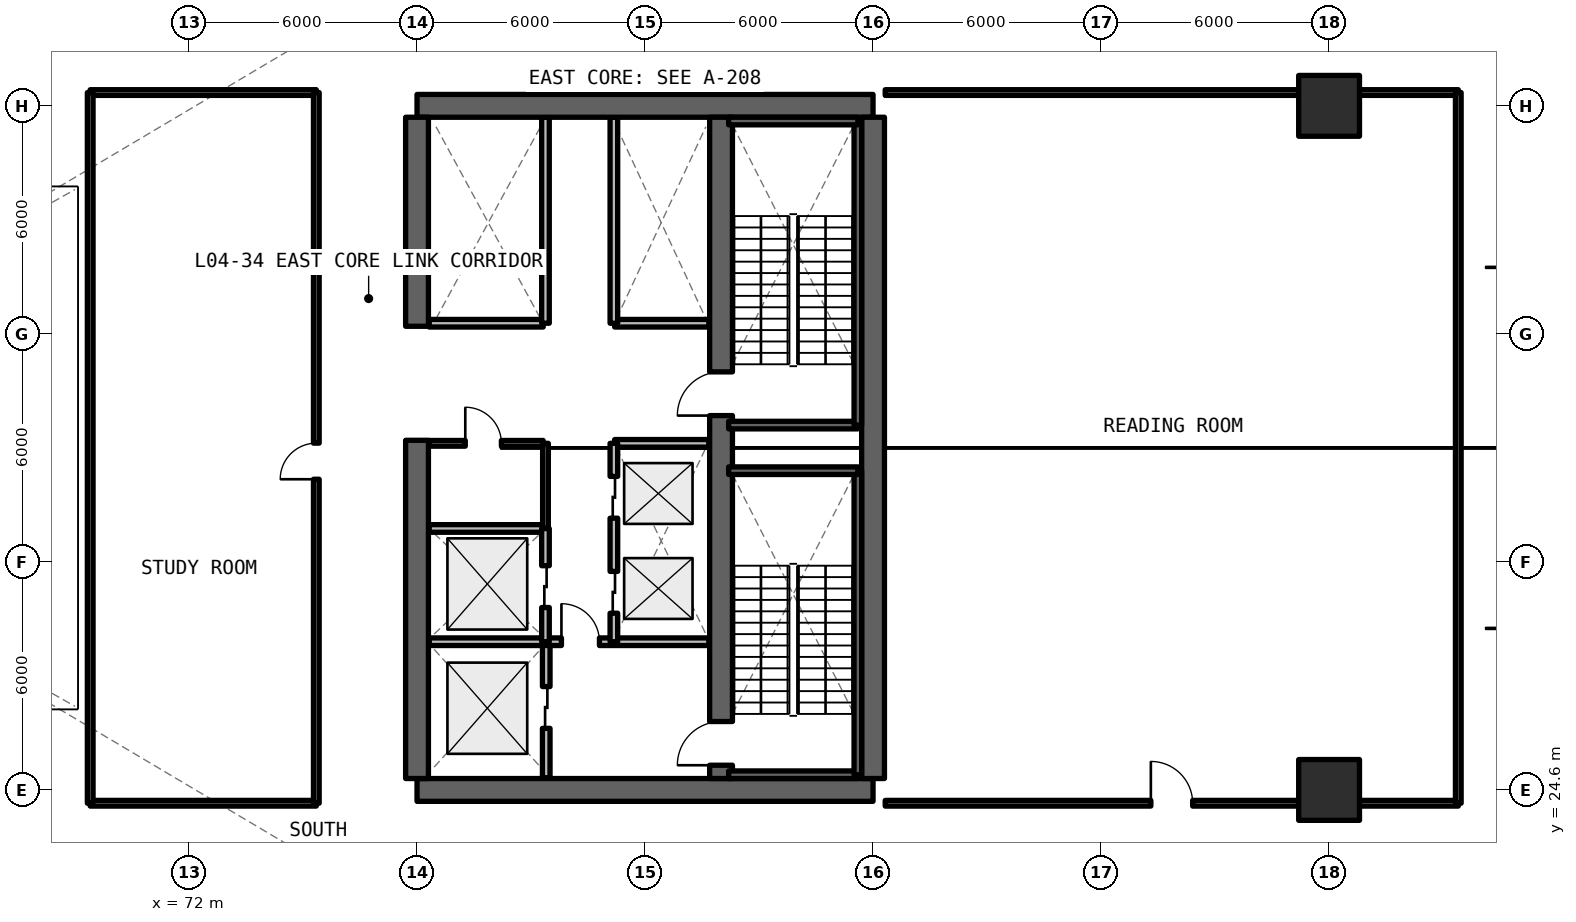
"""IFC4 building model, lengths in metres.
Left out: names, types, materials, properties, quantities, classifications, styles, units other than length and angle.
Written with IfcOpenShell. Run it as: python <this file> out.ifc"""

import sys

from ifc_helpers import new_model, si_unit, direction, frame, frame_2d, origin, origin_2d, place, context, subcontext, project, spatial, rectangle, extrude, element, fill, save


model = new_model("IFC4")
c1 = context("Model", 3, precision=1e-05, world=origin(), true_north=direction((0.0, 1.0)))
c2 = subcontext(c1, "Body", "Model", "MODEL_VIEW")
j1 = project(units=[si_unit("LENGTHUNIT", "METRE"), si_unit("PLANEANGLEUNIT", "RADIAN")], contexts=[c1])
p1 = place(None, origin())
s1 = spatial("IfcSite", under=j1, at=p1, CompositionType="ELEMENT")
p2 = place(p1, origin())
s2 = spatial("IfcBuilding", under=s1, at=p2, CompositionType="ELEMENT")
p3 = place(p2, frame((0.0, 0.0, 14.85)))
s3 = spatial("IfcBuildingStorey", under=s2, at=p3, CompositionType="ELEMENT", Elevation=14.85)
for number, where, z_axis, x_axis in (
    (1, (78.0, 24.6, 0.0), (0.0, 0.0, 1.0), (1.0, 0.0, 0.0)),
    (2, (90.0, 42.6, 0.0), (0.0, 0.0, 1.0), (-1.0, 0.0, 0.0)),
):
    element("IfcWall", number, at=place(p3, frame(where, z_axis=z_axis, x_axis=x_axis)), inside=s3, PredefinedType="SHEAR", context=c2, shape_type="SweptSolid", body=[
        extrude(rectangle(XDim=12.0, YDim=0.6, at=frame_2d((6.0, 0.0))), origin(), (0.0, 0.0, 1.0), 4.62),
    ])
p4 = place(p3, frame((90.0, 24.9, 0.0), z_axis=(0.0, 0.0, 1.0), x_axis=(0.0, 1.0, 0.0)))
e3 = element("IfcWall", 3, at=p4, inside=s3, PredefinedType="SHEAR", context=c2, shape_type="SweptSolid", body=[
    extrude(rectangle(XDim=17.4, YDim=0.6, at=frame_2d((8.7, 0.0))), origin(), (0.0, 0.0, 1.0), 4.62),
])
p5 = place(p3, frame((78.0, 24.9, 0.0), z_axis=(0.0, 0.0, 1.0), x_axis=(0.0, 1.0, 0.0)))
e4 = element("IfcWall", 4, at=p5, inside=s3, PredefinedType="SHEAR", context=c2, shape_type="SweptSolid", body=[
    extrude(rectangle(XDim=8.9, YDim=0.6, at=frame_2d((4.45, 0.0))), origin(), (0.0, 0.0, 1.0), 4.62),
])
p6 = place(p3, frame((78.0, 36.8, 0.0), z_axis=(0.0, 0.0, 1.0), x_axis=(0.0, 1.0, 0.0)))
e5 = element("IfcWall", 5, at=p6, inside=s3, PredefinedType="SHEAR", context=c2, shape_type="SweptSolid", body=[
    extrude(rectangle(XDim=5.5, YDim=0.6, at=frame_2d((2.75, 0.0))), origin(), (0.0, 0.0, 1.0), 4.62),
])
p7 = place(p3, frame((86.0, 24.9, 0.0), z_axis=(0.0, 0.0, 1.0), x_axis=(0.0, 1.0, 0.0)))
e6 = element("IfcWall", 6, at=p7, inside=s3, PredefinedType="SHEAR", context=c2, shape_type="SweptSolid", body=[
    extrude(rectangle(XDim=17.4, YDim=0.6, at=frame_2d((8.7, 0.0))), origin(), (0.0, 0.0, 1.0), 4.62),
])
p8 = place(p7, frame((0.35, 0.0, 0.0)))
e7 = element("IfcOpeningElement", 7, at=p8, cuts=e6, PredefinedType="OPENING", context=c2, shape_type="SweptSolid", body=[
    extrude(rectangle(XDim=1.15, YDim=2.15, at=frame_2d((0.575, 1.075))), frame((0.0, 0.31, 0.0), z_axis=(0.0, -1.0, 0.0), x_axis=(1.0, 0.0, 0.0)), (0.0, 0.0, 1.0), 0.62),
])
p9 = place(p7, frame((9.55, 0.0, 0.0)))
e8 = element("IfcOpeningElement", 8, at=p9, cuts=e6, PredefinedType="OPENING", context=c2, shape_type="SweptSolid", body=[
    extrude(rectangle(XDim=1.15, YDim=2.15, at=frame_2d((0.575, 1.075))), frame((0.0, 0.31, 0.0), z_axis=(0.0, -1.0, 0.0), x_axis=(1.0, 0.0, 0.0)), (0.0, 0.0, 1.0), 0.62),
])
for number, where, z_axis, x_axis in (
    (9, (102.0, 24.6, 0.0), (0.0, 0.0, 1.0), (1.0, 0.0, 0.0)),
    (10, (102.0, 42.6, 0.0), (0.0, 0.0, 1.0), (1.0, 0.0, 0.0)),
):
    element("IfcColumn", number, at=place(p3, frame(where, z_axis=z_axis, x_axis=x_axis)), inside=s3, PredefinedType="COLUMN", context=c2, shape_type="SweptSolid", body=[
        extrude(rectangle(XDim=1.6, YDim=1.6, at=origin_2d()), origin(), (0.0, 0.0, 1.0), 4.62),
    ])
p10 = place(p3, frame((81.4, 24.92, 0.0), z_axis=(0.0, 0.0, 1.0), x_axis=(0.0, 1.0, 0.0)))
e11 = element("IfcWall", 11, at=p10, inside=s3, PredefinedType="SOLIDWALL", context=c2, shape_type="SweptSolid", body=[
    extrude(rectangle(XDim=3.58, YDim=0.2, at=frame_2d((1.79, 0.0))), origin(), (0.0, 0.0, 1.0), 3.56),
])
p11 = place(p10, frame((1.3, 0.0, 0.0)))
e12 = element("IfcOpeningElement", 12, at=p11, cuts=e11, PredefinedType="OPENING", context=c2, shape_type="SweptSolid", body=[
    extrude(rectangle(XDim=1.1, YDim=2.2, at=frame_2d((0.55, 1.1))), frame((0.0, 0.11, 0.0), z_axis=(0.0, -1.0, 0.0), x_axis=(1.0, 0.0, 0.0)), (0.0, 0.0, 1.0), 0.22),
])
p12 = place(p3, frame((78.32, 28.5, 0.0), z_axis=(0.0, 0.0, 1.0), x_axis=(1.0, 0.0, 0.0)))
e13 = element("IfcWall", 13, at=p12, inside=s3, PredefinedType="SOLIDWALL", context=c2, shape_type="SweptSolid", body=[
    extrude(rectangle(XDim=7.36, YDim=0.2, at=frame_2d((3.68, 0.0))), origin(), (0.0, 0.0, 1.0), 3.56),
])
p13 = place(p12, frame((3.48, 0.0, 0.0)))
e14 = element("IfcOpeningElement", 14, at=p13, cuts=e13, PredefinedType="OPENING", context=c2, shape_type="SweptSolid", body=[
    extrude(rectangle(XDim=1.0, YDim=2.15, at=frame_2d((0.5, 1.075))), frame((0.0, 0.11, 0.0), z_axis=(0.0, -1.0, 0.0), x_axis=(1.0, 0.0, 0.0)), (0.0, 0.0, 1.0), 0.22),
])
p14 = place(p3, frame((83.2, 33.72, 0.0), z_axis=(0.0, 0.0, 1.0), x_axis=(1.0, 0.0, 0.0)))
e15 = element("IfcWall", 15, at=p14, inside=s3, PredefinedType="SOLIDWALL", context=c2, shape_type="SweptSolid", body=[
    extrude(rectangle(XDim=2.48, YDim=0.2, at=frame_2d((1.24, 0.0))), origin(), (0.0, 0.0, 1.0), 3.56),
])
p15 = place(p3, frame((83.18, 28.5, 0.0), z_axis=(0.0, 0.0, 1.0), x_axis=(0.0, 1.0, 0.0)))
e16 = element("IfcWall", 16, at=p15, inside=s3, PredefinedType="SOLIDWALL", context=c2, shape_type="SweptSolid", body=[
    extrude(rectangle(XDim=5.22, YDim=0.2, at=frame_2d((2.61, 0.0))), origin(), (0.0, 0.0, 1.0), 3.56),
])
p16 = place(p15, frame((0.75, 0.0, 0.0)))
e17 = element("IfcOpeningElement", 17, at=p16, cuts=e16, PredefinedType="OPENING", context=c2, shape_type="SweptSolid", body=[
    extrude(rectangle(XDim=1.1, YDim=2.2, at=frame_2d((0.55, 1.1))), frame((0.0, 0.11, 0.0), z_axis=(0.0, -1.0, 0.0), x_axis=(1.0, 0.0, 0.0)), (0.0, 0.0, 1.0), 0.22),
])
p17 = place(p15, frame((3.25, 0.0, 0.0)))
e18 = element("IfcOpeningElement", 18, at=p17, cuts=e16, PredefinedType="OPENING", context=c2, shape_type="SweptSolid", body=[
    extrude(rectangle(XDim=1.1, YDim=2.2, at=frame_2d((0.55, 1.1))), frame((0.0, 0.11, 0.0), z_axis=(0.0, -1.0, 0.0), x_axis=(1.0, 0.0, 0.0)), (0.0, 0.0, 1.0), 0.22),
])
p18 = place(p3, frame((78.32, 31.48, 0.0), z_axis=(0.0, 0.0, 1.0), x_axis=(1.0, 0.0, 0.0)))
e19 = element("IfcWall", 19, at=p18, inside=s3, PredefinedType="SOLIDWALL", context=c2, shape_type="SweptSolid", body=[
    extrude(rectangle(XDim=3.0, YDim=0.2, at=frame_2d((1.5, 0.0))), origin(), (0.0, 0.0, 1.0), 3.56),
])
p19 = place(p3, frame((81.38, 28.5, 0.0), z_axis=(0.0, 0.0, 1.0), x_axis=(0.0, 1.0, 0.0)))
e20 = element("IfcWall", 20, at=p19, inside=s3, PredefinedType="SOLIDWALL", context=c2, shape_type="SweptSolid", body=[
    extrude(rectangle(XDim=2.98, YDim=0.2, at=frame_2d((1.49, 0.0))), origin(), (0.0, 0.0, 1.0), 3.56),
])
p20 = place(p19, frame((0.9, 0.0, 0.0)))
e21 = element("IfcOpeningElement", 21, at=p20, cuts=e20, PredefinedType="OPENING", context=c2, shape_type="SweptSolid", body=[
    extrude(rectangle(XDim=1.1, YDim=2.2, at=frame_2d((0.55, 1.1))), frame((0.0, 0.11, 0.0), z_axis=(0.0, -1.0, 0.0), x_axis=(1.0, 0.0, 0.0)), (0.0, 0.0, 1.0), 0.22),
])
p21 = place(p3, frame((81.38, 31.48, 0.0), z_axis=(0.0, 0.0, 1.0), x_axis=(0.0, 1.0, 0.0)))
e22 = element("IfcWall", 22, at=p21, inside=s3, PredefinedType="SOLIDWALL", context=c2, shape_type="SweptSolid", body=[
    extrude(rectangle(XDim=2.24, YDim=0.15, at=frame_2d((1.12, 0.0))), origin(), (0.0, 0.0, 1.0), 3.56),
])
p22 = place(p3, frame((78.32, 33.72, 0.0), z_axis=(0.0, 0.0, 1.0), x_axis=(1.0, 0.0, 0.0)))
e23 = element("IfcWall", 23, at=p22, inside=s3, PredefinedType="SOLIDWALL", context=c2, shape_type="SweptSolid", body=[
    extrude(rectangle(XDim=3.0, YDim=0.15, at=frame_2d((1.5, 0.0))), origin(), (0.0, 0.0, 1.0), 3.56),
])
p23 = place(p22, frame((0.95, 0.0, 0.0)))
e24 = element("IfcOpeningElement", 24, at=p23, cuts=e23, PredefinedType="OPENING", context=c2, shape_type="SweptSolid", body=[
    extrude(rectangle(XDim=0.95, YDim=2.15, at=frame_2d((0.475, 1.075))), frame((0.0, 0.085, 0.0), z_axis=(0.0, -1.0, 0.0), x_axis=(1.0, 0.0, 0.0)), (0.0, 0.0, 1.0), 0.17),
])
p24 = place(p3, frame((83.2, 36.88, 0.0), z_axis=(0.0, 0.0, 1.0), x_axis=(1.0, 0.0, 0.0)))
e25 = element("IfcWall", 25, at=p24, inside=s3, PredefinedType="SOLIDWALL", context=c2, shape_type="SweptSolid", body=[
    extrude(rectangle(XDim=2.48, YDim=0.2, at=frame_2d((1.24, 0.0))), origin(), (0.0, 0.0, 1.0), 3.56),
])
p25 = place(p3, frame((83.18, 36.88, 0.0), z_axis=(0.0, 0.0, 1.0), x_axis=(0.0, 1.0, 0.0)))
e26 = element("IfcWall", 26, at=p25, inside=s3, PredefinedType="SOLIDWALL", context=c2, shape_type="SweptSolid", body=[
    extrude(rectangle(XDim=5.42, YDim=0.2, at=frame_2d((2.71, 0.0))), origin(), (0.0, 0.0, 1.0), 3.56),
])
p26 = place(p3, frame((78.32, 36.88, 0.0), z_axis=(0.0, 0.0, 1.0), x_axis=(1.0, 0.0, 0.0)))
e27 = element("IfcWall", 27, at=p26, inside=s3, PredefinedType="SOLIDWALL", context=c2, shape_type="SweptSolid", body=[
    extrude(rectangle(XDim=3.0, YDim=0.2, at=frame_2d((1.5, 0.0))), origin(), (0.0, 0.0, 1.0), 3.56),
])
p27 = place(p3, frame((81.38, 36.88, 0.0), z_axis=(0.0, 0.0, 1.0), x_axis=(0.0, 1.0, 0.0)))
e28 = element("IfcWall", 28, at=p27, inside=s3, PredefinedType="SOLIDWALL", context=c2, shape_type="SweptSolid", body=[
    extrude(rectangle(XDim=5.42, YDim=0.2, at=frame_2d((2.71, 0.0))), origin(), (0.0, 0.0, 1.0), 3.56),
])
for number, where, z_axis, x_axis in (
    (29, (69.4, 24.25, 0.0), (0.0, 0.0, 1.0), (1.0, 0.0, 0.0)),
    (30, (69.4, 42.95, 0.0), (0.0, 0.0, 1.0), (1.0, 0.0, 0.0)),
):
    element("IfcWall", number, at=place(p3, frame(where, z_axis=z_axis, x_axis=x_axis)), inside=s3, PredefinedType="SOLIDWALL", context=c2, shape_type="SweptSolid", body=[
        extrude(rectangle(XDim=5.95, YDim=0.15, at=frame_2d((2.975, 0.0))), origin(), (0.0, 0.0, 1.0), 3.56),
    ])
p28 = place(p3, frame((69.4, 24.25, 0.0), z_axis=(0.0, 0.0, 1.0), x_axis=(0.0, 1.0, 0.0)))
e31 = element("IfcWall", 31, at=p28, inside=s3, PredefinedType="SOLIDWALL", context=c2, shape_type="SweptSolid", body=[
    extrude(rectangle(XDim=18.7, YDim=0.15, at=frame_2d((9.35, 0.0))), origin(), (0.0, 0.0, 1.0), 3.56),
])
p29 = place(p3, frame((75.35, 24.25, 0.0), z_axis=(0.0, 0.0, 1.0), x_axis=(0.0, 1.0, 0.0)))
e32 = element("IfcWall", 32, at=p29, inside=s3, PredefinedType="SOLIDWALL", context=c2, shape_type="SweptSolid", body=[
    extrude(rectangle(XDim=18.7, YDim=0.15, at=frame_2d((9.35, 0.0))), origin(), (0.0, 0.0, 1.0), 3.56),
])
p30 = place(p29, frame((8.525, 0.0, 0.0)))
e33 = element("IfcOpeningElement", 33, at=p30, cuts=e32, PredefinedType="OPENING", context=c2, shape_type="SweptSolid", body=[
    extrude(rectangle(XDim=0.95, YDim=2.15, at=frame_2d((0.475, 1.075))), frame((0.0, 0.085, 0.0), z_axis=(0.0, -1.0, 0.0), x_axis=(1.0, 0.0, 0.0)), (0.0, 0.0, 1.0), 0.17),
])
p31 = place(p3, frame((90.32, 24.25, 0.0), z_axis=(0.0, 0.0, 1.0), x_axis=(1.0, 0.0, 0.0)))
e34 = element("IfcWall", 34, at=p31, inside=s3, PredefinedType="SOLIDWALL", context=c2, shape_type="SweptSolid", body=[
    extrude(rectangle(XDim=15.08, YDim=0.15, at=frame_2d((7.54, 0.0))), origin(), (0.0, 0.0, 1.0), 3.56),
])
p32 = place(p31, frame((6.99, 0.0, 0.0)))
e35 = element("IfcOpeningElement", 35, at=p32, cuts=e34, PredefinedType="OPENING", context=c2, shape_type="SweptSolid", body=[
    extrude(rectangle(XDim=1.1, YDim=2.15, at=frame_2d((0.55, 1.075))), frame((0.0, 0.085, 0.0), z_axis=(0.0, -1.0, 0.0), x_axis=(1.0, 0.0, 0.0)), (0.0, 0.0, 1.0), 0.17),
])
p33 = place(p3, frame((90.32, 42.95, 0.0), z_axis=(0.0, 0.0, 1.0), x_axis=(1.0, 0.0, 0.0)))
e36 = element("IfcWall", 36, at=p33, inside=s3, PredefinedType="SOLIDWALL", context=c2, shape_type="SweptSolid", body=[
    extrude(rectangle(XDim=15.08, YDim=0.15, at=frame_2d((7.54, 0.0))), origin(), (0.0, 0.0, 1.0), 3.56),
])
p34 = place(p3, frame((105.4, 24.25, 0.0), z_axis=(0.0, 0.0, 1.0), x_axis=(0.0, 1.0, 0.0)))
e37 = element("IfcWall", 37, at=p34, inside=s3, PredefinedType="SOLIDWALL", context=c2, shape_type="SweptSolid", body=[
    extrude(rectangle(XDim=18.7, YDim=0.15, at=frame_2d((9.35, 0.0))), origin(), (0.0, 0.0, 1.0), 3.56),
])
p35 = place(p3, frame((86.2, 25.0, 0.0), z_axis=(0.0, 0.0, 1.0), x_axis=(1.0, 0.0, 0.0)))
e38 = element("IfcWall", 38, at=p35, inside=s3, PredefinedType="SOLIDWALL", context=c2, shape_type="SweptSolid", body=[
    extrude(rectangle(XDim=3.4, YDim=0.2, at=frame_2d((1.7, 0.0))), origin(), (0.0, 0.0, 1.0), 4.62),
])
p36 = place(p3, frame((89.6, 25.0, 0.0), z_axis=(0.0, 0.0, 1.0), x_axis=(0.0, 1.0, 0.0)))
e39 = element("IfcWall", 39, at=p36, inside=s3, PredefinedType="SOLIDWALL", context=c2, shape_type="SweptSolid", body=[
    extrude(rectangle(XDim=8.0, YDim=0.2, at=frame_2d((4.0, 0.0))), origin(), (0.0, 0.0, 1.0), 4.62),
])
for number, where, z_axis, x_axis in (
    (40, (89.6, 33.0, 0.0), (0.0, 0.0, 1.0), (-1.0, 0.0, 0.0)),
    (41, (86.2, 34.2, 0.0), (0.0, 0.0, 1.0), (1.0, 0.0, 0.0)),
):
    element("IfcWall", number, at=place(p3, frame(where, z_axis=z_axis, x_axis=x_axis)), inside=s3, PredefinedType="SOLIDWALL", context=c2, shape_type="SweptSolid", body=[
        extrude(rectangle(XDim=3.4, YDim=0.2, at=frame_2d((1.7, 0.0))), origin(), (0.0, 0.0, 1.0), 4.62),
    ])
p37 = place(p3, frame((89.6, 34.2, 0.0), z_axis=(0.0, 0.0, 1.0), x_axis=(0.0, 1.0, 0.0)))
e42 = element("IfcWall", 42, at=p37, inside=s3, PredefinedType="SOLIDWALL", context=c2, shape_type="SweptSolid", body=[
    extrude(rectangle(XDim=8.0, YDim=0.2, at=frame_2d((4.0, 0.0))), origin(), (0.0, 0.0, 1.0), 4.62),
])
p38 = place(p3, frame((89.6, 42.2, 0.0), z_axis=(0.0, 0.0, 1.0), x_axis=(-1.0, 0.0, 0.0)))
e43 = element("IfcWall", 43, at=p38, inside=s3, PredefinedType="SOLIDWALL", context=c2, shape_type="SweptSolid", body=[
    extrude(rectangle(XDim=3.4, YDim=0.2, at=frame_2d((1.7, 0.0))), origin(), (0.0, 0.0, 1.0), 4.62),
])
p39 = place(p11, origin())
e44 = element("IfcDoor", 44, at=p39, inside=s3, OperationType="SLIDING_TO_LEFT", PredefinedType="DOOR", context=c2, shape_type="SweptSolid", body=[
    extrude(rectangle(XDim=1.1, YDim=2.2, at=frame_2d((0.55, 1.1))), frame((0.0, 0.025, 0.0), z_axis=(0.0, -1.0, 0.0), x_axis=(1.0, 0.0, 0.0)), (0.0, 0.0, 1.0), 0.05),
])
fill(e12, e44)
p40 = place(p13, origin())
e45 = element("IfcDoor", 45, at=p40, inside=s3, OperationType="SINGLE_SWING_LEFT", PredefinedType="DOOR", context=c2, shape_type="SweptSolid", body=[
    extrude(rectangle(XDim=1.0, YDim=2.15, at=frame_2d((0.5, 1.075))), frame((0.0, 0.025, 0.0), z_axis=(0.0, -1.0, 0.0), x_axis=(1.0, 0.0, 0.0)), (0.0, 0.0, 1.0), 0.05),
])
fill(e14, e45)
p41 = place(p16, origin())
e46 = element("IfcDoor", 46, at=p41, inside=s3, OperationType="SLIDING_TO_LEFT", PredefinedType="DOOR", context=c2, shape_type="SweptSolid", body=[
    extrude(rectangle(XDim=1.1, YDim=2.2, at=frame_2d((0.55, 1.1))), frame((0.0, 0.025, 0.0), z_axis=(0.0, -1.0, 0.0), x_axis=(1.0, 0.0, 0.0)), (0.0, 0.0, 1.0), 0.05),
])
fill(e17, e46)
p42 = place(p17, origin())
e47 = element("IfcDoor", 47, at=p42, inside=s3, OperationType="SLIDING_TO_RIGHT", PredefinedType="DOOR", context=c2, shape_type="SweptSolid", body=[
    extrude(rectangle(XDim=1.1, YDim=2.2, at=frame_2d((0.55, 1.1))), frame((0.0, 0.025, 0.0), z_axis=(0.0, -1.0, 0.0), x_axis=(1.0, 0.0, 0.0)), (0.0, 0.0, 1.0), 0.05),
])
fill(e18, e47)
p43 = place(p20, origin())
e48 = element("IfcDoor", 48, at=p43, inside=s3, OperationType="SLIDING_TO_LEFT", PredefinedType="DOOR", context=c2, shape_type="SweptSolid", body=[
    extrude(rectangle(XDim=1.1, YDim=2.2, at=frame_2d((0.55, 1.1))), frame((0.0, 0.025, 0.0), z_axis=(0.0, -1.0, 0.0), x_axis=(1.0, 0.0, 0.0)), (0.0, 0.0, 1.0), 0.05),
])
fill(e21, e48)
p44 = place(p23, origin())
e49 = element("IfcDoor", 49, at=p44, inside=s3, OperationType="SINGLE_SWING_LEFT", PredefinedType="DOOR", context=c2, shape_type="SweptSolid", body=[
    extrude(rectangle(XDim=0.95, YDim=2.15, at=frame_2d((0.475, 1.075))), frame((0.0, 0.025, 0.0), z_axis=(0.0, -1.0, 0.0), x_axis=(1.0, 0.0, 0.0)), (0.0, 0.0, 1.0), 0.05),
])
fill(e24, e49)
p45 = place(p30, origin())
e50 = element("IfcDoor", 50, at=p45, inside=s3, OperationType="SINGLE_SWING_LEFT", PredefinedType="DOOR", context=c2, shape_type="SweptSolid", body=[
    extrude(rectangle(XDim=0.95, YDim=2.15, at=frame_2d((0.475, 1.075))), frame((0.0, 0.025, 0.0), z_axis=(0.0, -1.0, 0.0), x_axis=(1.0, 0.0, 0.0)), (0.0, 0.0, 1.0), 0.05),
])
fill(e33, e50)
p46 = place(p32, origin())
e51 = element("IfcDoor", 51, at=p46, inside=s3, OperationType="SINGLE_SWING_LEFT", PredefinedType="DOOR", context=c2, shape_type="SweptSolid", body=[
    extrude(rectangle(XDim=1.1, YDim=2.15, at=frame_2d((0.55, 1.075))), frame((0.0, 0.025, 0.0), z_axis=(0.0, -1.0, 0.0), x_axis=(1.0, 0.0, 0.0)), (0.0, 0.0, 1.0), 0.05),
])
fill(e35, e51)
p47 = place(p8, origin())
e52 = element("IfcDoor", 52, at=p47, inside=s3, OperationType="SINGLE_SWING_RIGHT", PredefinedType="DOOR", context=c2, shape_type="SweptSolid", body=[
    extrude(rectangle(XDim=1.15, YDim=2.15, at=frame_2d((0.575, 1.075))), frame((0.0, 0.025, 0.0), z_axis=(0.0, -1.0, 0.0), x_axis=(1.0, 0.0, 0.0)), (0.0, 0.0, 1.0), 0.05),
])
fill(e7, e52)
p48 = place(p9, origin())
e53 = element("IfcDoor", 53, at=p48, inside=s3, OperationType="SINGLE_SWING_LEFT", PredefinedType="DOOR", context=c2, shape_type="SweptSolid", body=[
    extrude(rectangle(XDim=1.15, YDim=2.15, at=frame_2d((0.575, 1.075))), frame((0.0, 0.025, 0.0), z_axis=(0.0, -1.0, 0.0), x_axis=(1.0, 0.0, 0.0)), (0.0, 0.0, 1.0), 0.05),
])
fill(e8, e53)
save(model, sys.argv[1])
